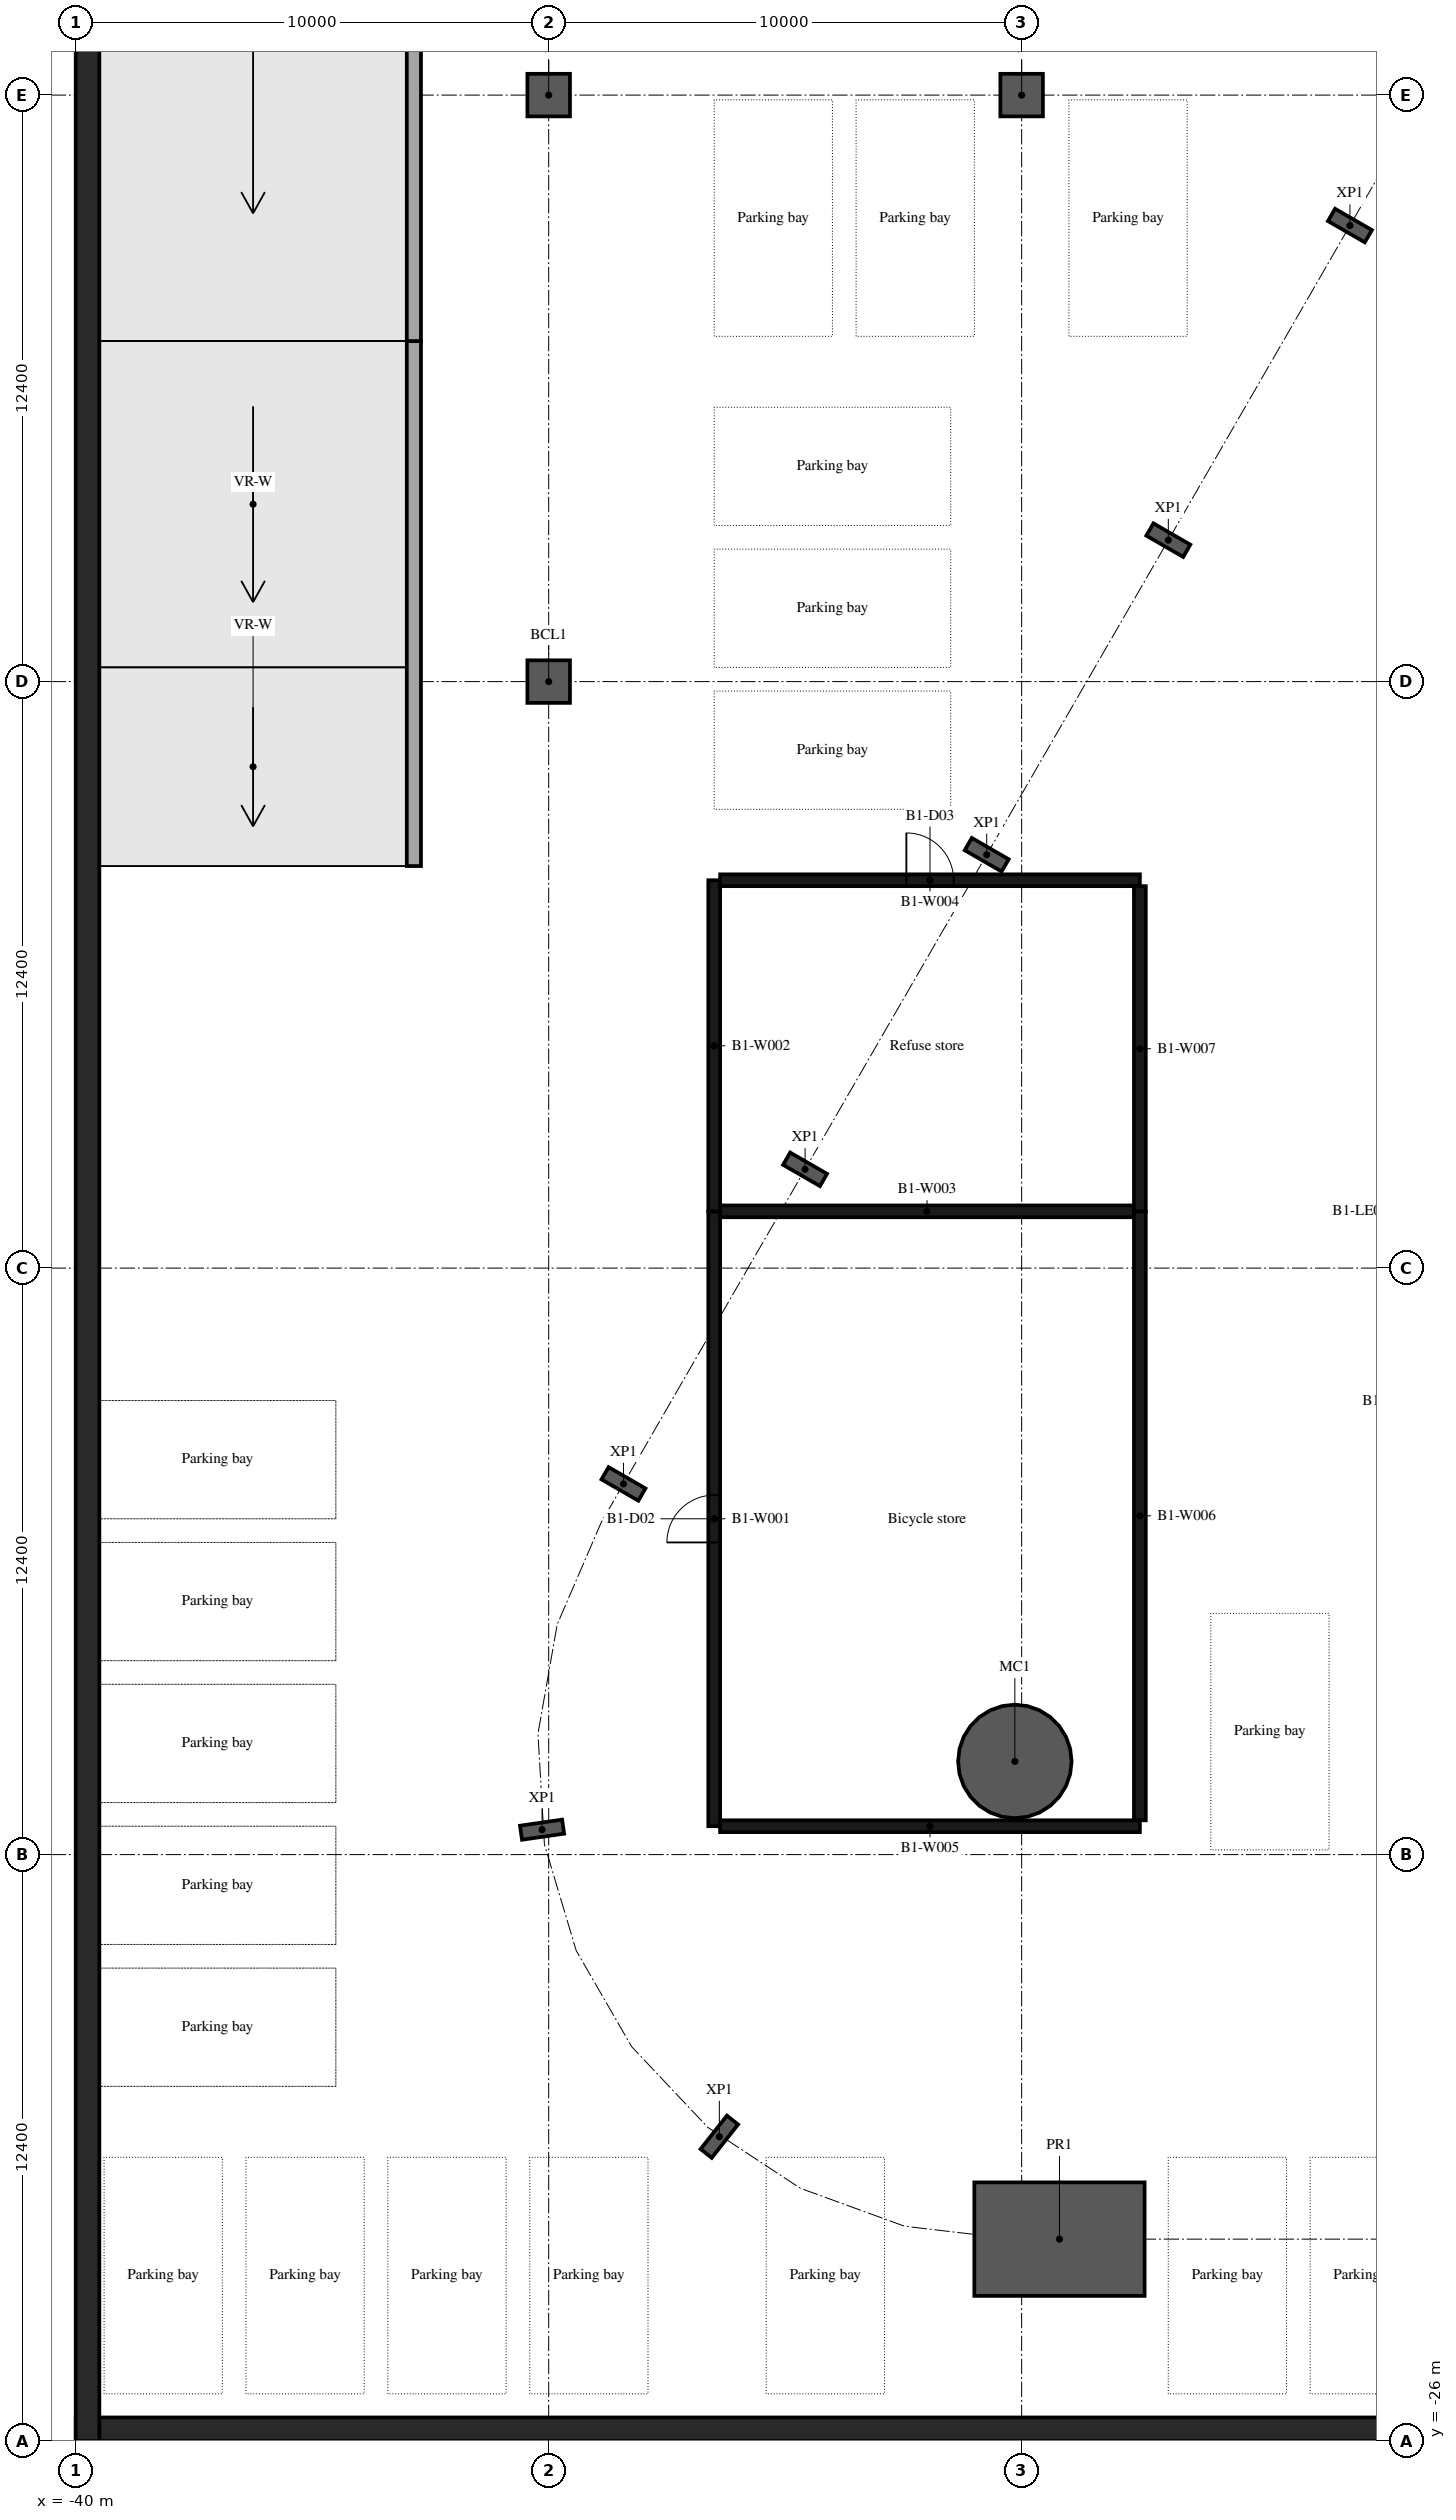
"""IFC4 building model, lengths in metres.
Left out: names, types, materials, properties, quantities, classifications, styles, units other than length and angle.
Written with IfcOpenShell. Run it as: python <this file> out.ifc"""

import sys

from ifc_helpers import new_model, si_unit, direction, frame, frame_2d, origin, origin_2d, place, context, subcontext, project, spatial, rectangle, hollow_circle, i_section, extrude, element, fill, save


model = new_model("IFC4")
c1 = context("Model", 3, precision=1e-05, world=origin(), true_north=direction((0.0, 1.0)))
c2 = subcontext(c1, "Body", "Model", "MODEL_VIEW")
j1 = project(units=[si_unit("LENGTHUNIT", "METRE"), si_unit("PLANEANGLEUNIT", "RADIAN")], contexts=[c1])
p1 = place(None, origin())
s1 = spatial("IfcSite", under=j1, at=p1, CompositionType="ELEMENT")
p2 = place(p1, origin())
s2 = spatial("IfcBuilding", under=s1, at=p2, CompositionType="ELEMENT")
p3 = place(p2, frame((0.0, 0.0, -4.2)))
s3 = spatial("IfcBuildingStorey", under=s2, at=p3, CompositionType="ELEMENT", Elevation=-4.2)
for number, where, z_axis, x_axis in (
    (1, (-30.0, 11.2, -0.38), (0.0, 0.0, 1.0), (1.0, 0.0, 0.0)),
    (2, (-30.0, 23.6, -0.38), (0.0, 0.0, 1.0), (1.0, 0.0, 0.0)),
    (3, (-20.0, 23.6, -0.38), (0.0, 0.0, 1.0), (1.0, 0.0, 0.0)),
):
    element("IfcColumn", number, at=place(p3, frame(where, z_axis=z_axis, x_axis=x_axis)), inside=s3, PredefinedType="COLUMN", context=c2, shape_type="SweptSolid", body=[
        extrude(rectangle(XDim=0.9, YDim=0.9, at=origin_2d()), origin(), (0.0, 0.0, 1.0), 3.88),
    ])
p4 = place(p3, frame((-20.144, -11.63, -0.38), z_axis=(0.0, 0.0, 1.0), x_axis=(1.0, 0.0, 0.0)))
e4 = element("IfcColumn", 4, at=p4, inside=s3, PredefinedType="COLUMN", context=c2, shape_type="SweptSolid", body=[
    extrude(hollow_circle(Radius=1.2, WallThickness=0.06, at=origin_2d()), origin(), (0.0, 0.0, 1.0), 4.16),
])
for number, where, z_axis, x_axis in (
    (5, (-13.059, 20.842, -0.38), (0.0, 0.0, 1.0), (0.5, 0.866, 0.0)),
    (6, (-16.899, 14.19, -0.38), (0.0, 0.0, 1.0), (0.5, 0.866, 0.0)),
    (7, (-20.739, 7.539, -0.38), (0.0, 0.0, 1.0), (0.5, 0.866, 0.0)),
    (8, (-24.579, 0.888, -0.38), (0.0, 0.0, 1.0), (0.5, 0.866, 0.0)),
    (9, (-28.419, -5.763, -0.38), (0.0, 0.0, 1.0), (0.5, 0.866, 0.0)),
    (10, (-30.14, -13.073, -0.38), (0.0, 0.0, 1.0), (-0.143, 0.99, 0.0)),
    (11, (-26.392, -19.565, -0.38), (0.0, 0.0, 1.0), (-0.786, 0.619, 0.0)),
):
    element("IfcColumn", number, at=place(p3, frame(where, z_axis=z_axis, x_axis=x_axis)), inside=s3, PredefinedType="COLUMN", context=c2, shape_type="SweptSolid", body=[
        extrude(i_section(OverallWidth=0.3, OverallDepth=0.9, WebThickness=0.019, FlangeThickness=0.035, FilletRadius=0.03, at=origin_2d()), origin(), (0.0, 0.0, 1.0), 4.16),
    ])
p5 = place(p3, frame((-19.2, -21.73, -0.38), z_axis=(0.0, 0.0, 1.0), x_axis=(1.0, 0.0, 0.0)))
e12 = element("IfcColumn", 12, at=p5, inside=s3, PredefinedType="COLUMN", context=c2, shape_type="SweptSolid", body=[
    extrude(rectangle(XDim=3.6, YDim=2.4, at=origin_2d()), origin(), (0.0, 0.0, 1.0), 4.16),
])
p6 = place(p3, frame((-40.0, -25.75, -0.38), z_axis=(0.0, 0.0, 1.0), x_axis=(1.0, 0.0, 0.0)))
e13 = element("IfcWall", 13, at=p6, inside=s3, PredefinedType="SOLIDWALL", context=c2, shape_type="SweptSolid", body=[
    extrude(rectangle(XDim=80.0, YDim=0.5, at=frame_2d((40.0, 0.0))), origin(), (0.0, 0.0, 1.0), 3.88),
])
p7 = place(p3, frame((-39.75, 36.0, -0.38), z_axis=(0.0, 0.0, 1.0), x_axis=(0.0, -1.0, 0.0)))
e14 = element("IfcWall", 14, at=p7, inside=s3, PredefinedType="SOLIDWALL", context=c2, shape_type="SweptSolid", body=[
    extrude(rectangle(XDim=62.0, YDim=0.5, at=frame_2d((31.0, 0.0))), origin(), (0.0, 0.0, 1.0), 3.88),
])
p8 = place(p3, frame((-32.85, 7.3, 0.0), z_axis=(0.0, 0.0, 1.0), x_axis=(0.0, 1.0, 0.0)))
e15 = element("IfcWall", 15, at=p8, inside=s3, PredefinedType="SOLIDWALL", context=c2, shape_type="SweptSolid", body=[
    extrude(rectangle(XDim=11.1, YDim=0.3, at=frame_2d((5.55, 0.0))), origin(), (0.0, 0.0, 1.0), 3.5),
])
p9 = place(p3, frame((-32.85, 18.4, 0.0), z_axis=(0.0, 0.0, 1.0), x_axis=(0.0, 1.0, 0.0)))
e16 = element("IfcWall", 16, at=p9, inside=s3, PredefinedType="SOLIDWALL", context=c2, shape_type="SweptSolid", body=[
    extrude(rectangle(XDim=17.1, YDim=0.3, at=frame_2d((8.55, 0.0))), origin(), (0.0, 0.0, 1.0), 3.5),
])
p10 = place(p3, frame((-26.5, -13.0, 0.0), z_axis=(0.0, 0.0, 1.0), x_axis=(0.0, 1.0, 0.0)))
e17 = element("IfcWall", 17, at=p10, inside=s3, PredefinedType="PARTITIONING", context=c2, shape_type="SweptSolid", body=[
    extrude(rectangle(XDim=13.0, YDim=0.25, at=frame_2d((6.5, 0.0))), origin(), (0.0, 0.0, 1.0), 3.0),
])
p11 = place(p10, frame((6.0, 0.0, 0.0)))
e18 = element("IfcOpeningElement", 18, at=p11, cuts=e17, PredefinedType="OPENING", context=c2, shape_type="SweptSolid", body=[
    extrude(rectangle(XDim=1.0, YDim=2.1, at=frame_2d((0.5, 1.05))), frame((0.0, 0.135, 0.0), z_axis=(0.0, -1.0, 0.0), x_axis=(1.0, 0.0, 0.0)), (0.0, 0.0, 1.0), 0.27),
])
p12 = place(p3, frame((-26.5, 0.0, 0.0), z_axis=(0.0, 0.0, 1.0), x_axis=(0.0, 1.0, 0.0)))
e19 = element("IfcWall", 19, at=p12, inside=s3, PredefinedType="PARTITIONING", context=c2, shape_type="SweptSolid", body=[
    extrude(rectangle(XDim=7.0, YDim=0.25, at=frame_2d((3.5, 0.0))), origin(), (0.0, 0.0, 1.0), 3.5),
])
p13 = place(p3, frame((-26.375, 0.0, 0.0), z_axis=(0.0, 0.0, 1.0), x_axis=(1.0, 0.0, 0.0)))
e20 = element("IfcWall", 20, at=p13, inside=s3, PredefinedType="PARTITIONING", context=c2, shape_type="SweptSolid", body=[
    extrude(rectangle(XDim=8.75, YDim=0.25, at=frame_2d((4.375, 0.0))), origin(), (0.0, 0.0, 1.0), 3.0),
])
p14 = place(p3, frame((-26.375, 7.0, 0.0), z_axis=(0.0, 0.0, 1.0), x_axis=(1.0, 0.0, 0.0)))
e21 = element("IfcWall", 21, at=p14, inside=s3, PredefinedType="PARTITIONING", context=c2, shape_type="SweptSolid", body=[
    extrude(rectangle(XDim=8.875, YDim=0.25, at=frame_2d((4.438, 0.0))), origin(), (0.0, 0.0, 1.0), 3.0),
])
p15 = place(p14, frame((3.938, 0.0, 0.0)))
e22 = element("IfcOpeningElement", 22, at=p15, cuts=e21, PredefinedType="OPENING", context=c2, shape_type="SweptSolid", body=[
    extrude(rectangle(XDim=1.0, YDim=2.1, at=frame_2d((0.5, 1.05))), frame((0.0, 0.135, 0.0), z_axis=(0.0, -1.0, 0.0), x_axis=(1.0, 0.0, 0.0)), (0.0, 0.0, 1.0), 0.27),
])
p16 = place(p3, frame((-17.5, -13.0, 0.0), z_axis=(0.0, 0.0, 1.0), x_axis=(-1.0, 0.0, 0.0)))
e23 = element("IfcWall", 23, at=p16, inside=s3, PredefinedType="PARTITIONING", context=c2, shape_type="SweptSolid", body=[
    extrude(rectangle(XDim=8.875, YDim=0.25, at=frame_2d((4.438, 0.0))), origin(), (0.0, 0.0, 1.0), 3.5),
])
p17 = place(p3, frame((-17.5, 0.0, 0.0), z_axis=(0.0, 0.0, 1.0), x_axis=(0.0, -1.0, 0.0)))
e24 = element("IfcWall", 24, at=p17, inside=s3, PredefinedType="PARTITIONING", context=c2, shape_type="SweptSolid", body=[
    extrude(rectangle(XDim=12.875, YDim=0.25, at=frame_2d((6.438, 0.0))), origin(), (0.0, 0.0, 1.0), 3.5),
])
p18 = place(p3, frame((-17.5, 6.875, 0.0), z_axis=(0.0, 0.0, 1.0), x_axis=(0.0, -1.0, 0.0)))
e25 = element("IfcWall", 25, at=p18, inside=s3, PredefinedType="PARTITIONING", context=c2, shape_type="SweptSolid", body=[
    extrude(rectangle(XDim=6.875, YDim=0.25, at=frame_2d((3.438, 0.0))), origin(), (0.0, 0.0, 1.0), 3.5),
])
p19 = place(p11, origin())
e26 = element("IfcDoor", 26, at=p19, inside=s3, OperationType="SINGLE_SWING_LEFT", PredefinedType="DOOR", context=c2, shape_type="SweptSolid", body=[
    extrude(rectangle(XDim=1.0, YDim=2.1, at=frame_2d((0.5, 1.05))), frame((0.0, 0.025, 0.0), z_axis=(0.0, -1.0, 0.0), x_axis=(1.0, 0.0, 0.0)), (0.0, 0.0, 1.0), 0.05),
])
fill(e18, e26)
p20 = place(p15, origin())
e27 = element("IfcDoor", 27, at=p20, inside=s3, OperationType="SINGLE_SWING_LEFT", PredefinedType="DOOR", context=c2, shape_type="SweptSolid", body=[
    extrude(rectangle(XDim=1.0, YDim=2.1, at=frame_2d((0.5, 1.05))), frame((0.0, 0.025, 0.0), z_axis=(0.0, -1.0, 0.0), x_axis=(1.0, 0.0, 0.0)), (0.0, 0.0, 1.0), 0.05),
])
fill(e22, e27)
save(model, sys.argv[1])
